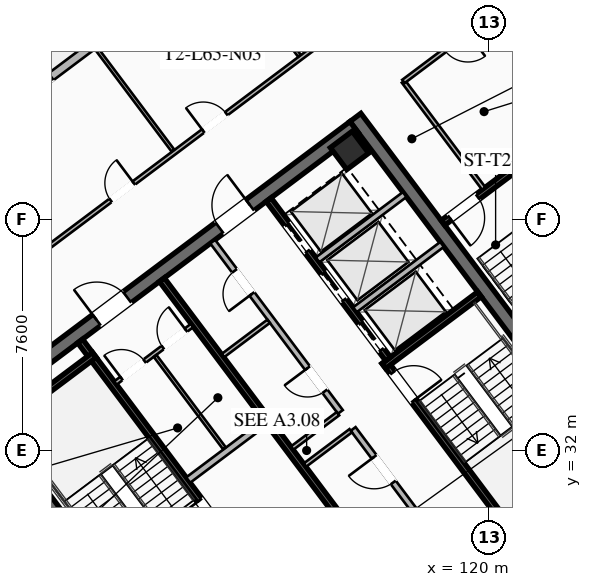
"""IFC4 building model, lengths in metres.
Left out: names, types, materials, properties, quantities, classifications, styles, units other than length and angle.
Written with IfcOpenShell. Run it as: python <this file> out.ifc"""

import sys

from ifc_helpers import new_model, si_unit, direction, frame, frame_2d, origin, origin_2d, place, context, subcontext, project, spatial, rectangle, hollow_rectangle, extrude, element, fill, save


model = new_model("IFC4")
c1 = context("Model", 3, precision=1e-05, world=origin(), true_north=direction((0.0, 1.0)))
c2 = subcontext(c1, "Body", "Model", "MODEL_VIEW")
j1 = project(units=[si_unit("LENGTHUNIT", "METRE"), si_unit("PLANEANGLEUNIT", "RADIAN")], contexts=[c1])
p1 = place(None, origin())
s1 = spatial("IfcSite", under=j1, at=p1, CompositionType="ELEMENT")
p2 = place(p1, origin())
s2 = spatial("IfcBuilding", under=s1, at=p2, CompositionType="ELEMENT")
p3 = place(p2, frame((0.0, 0.0, 239.7)))
s3 = spatial("IfcBuildingStorey", under=s2, at=p3, CompositionType="ELEMENT", Elevation=239.7)
for number, where, z_axis, x_axis in (
    (1, (112.396, 21.047, 0.0), (0.0, 0.0, 1.0), (-0.6, 0.8, 0.0)),
    (2, (115.604, 42.953, 0.0), (0.0, 0.0, 1.0), (0.6, -0.8, 0.0)),
):
    element("IfcWall", number, at=place(p3, frame(where, z_axis=z_axis, x_axis=x_axis)), inside=s3, PredefinedType="SHEAR", context=c2, shape_type="SweptSolid", body=[
        extrude(rectangle(XDim=15.6, YDim=0.45, at=frame_2d((7.8, 0.0))), origin(), (0.0, 0.0, 1.0), 3.55),
    ])
p4 = place(p3, frame((124.649, 30.518, 0.0), z_axis=(0.0, 0.0, 1.0), x_axis=(-0.8, -0.6, 0.0)))
e3 = element("IfcWall", 3, at=p4, inside=s3, PredefinedType="SHEAR", context=c2, shape_type="SweptSolid", body=[
    extrude(rectangle(XDim=15.26, YDim=0.45, at=frame_2d((7.63, 0.0))), origin(), (0.0, 0.0, 1.0), 3.55),
])
p5 = place(p4, frame((9.33, 0.0, 0.0)))
e4 = element("IfcOpeningElement", 4, at=p5, cuts=e3, PredefinedType="OPENING", context=c2, shape_type="SweptSolid", body=[
    extrude(rectangle(XDim=1.25, YDim=2.25, at=frame_2d((0.625, 1.125))), frame((0.0, 0.235, 0.0), z_axis=(0.0, -1.0, 0.0), x_axis=(1.0, 0.0, 0.0)), (0.0, 0.0, 1.0), 0.47),
])
p6 = place(p4, frame((4.28, 0.0, 0.0)))
e5 = element("IfcOpeningElement", 5, at=p6, cuts=e3, PredefinedType="OPENING", context=c2, shape_type="SweptSolid", body=[
    extrude(rectangle(XDim=1.25, YDim=2.25, at=frame_2d((0.625, 1.125))), frame((0.0, 0.235, 0.0), z_axis=(0.0, -1.0, 0.0), x_axis=(1.0, 0.0, 0.0)), (0.0, 0.0, 1.0), 0.47),
])
p7 = place(p3, frame((103.351, 33.482, 0.0), z_axis=(0.0, 0.0, 1.0), x_axis=(0.8, 0.6, 0.0)))
e6 = element("IfcWall", 6, at=p7, inside=s3, PredefinedType="SHEAR", context=c2, shape_type="SweptSolid", body=[
    extrude(rectangle(XDim=15.26, YDim=0.45, at=frame_2d((7.63, 0.0))), origin(), (0.0, 0.0, 1.0), 3.55),
])
p8 = place(p7, frame((4.68, 0.0, 0.0)))
e7 = element("IfcOpeningElement", 7, at=p8, cuts=e6, PredefinedType="OPENING", context=c2, shape_type="SweptSolid", body=[
    extrude(rectangle(XDim=1.25, YDim=2.25, at=frame_2d((0.625, 1.125))), frame((0.0, 0.235, 0.0), z_axis=(0.0, -1.0, 0.0), x_axis=(1.0, 0.0, 0.0)), (0.0, 0.0, 1.0), 0.47),
])
p9 = place(p7, frame((9.73, 0.0, 0.0)))
e8 = element("IfcOpeningElement", 8, at=p9, cuts=e6, PredefinedType="OPENING", context=c2, shape_type="SweptSolid", body=[
    extrude(rectangle(XDim=1.25, YDim=2.25, at=frame_2d((0.625, 1.125))), frame((0.0, 0.235, 0.0), z_axis=(0.0, -1.0, 0.0), x_axis=(1.0, 0.0, 0.0)), (0.0, 0.0, 1.0), 0.47),
])
p10 = place(p3, frame((115.41, 41.87, 0.0), z_axis=(0.0, 0.0, 1.0), x_axis=(0.799999996291, 0.600000004945, 0.0)))
e9 = element("IfcColumn", 9, at=p10, inside=s3, PredefinedType="COLUMN", context=c2, shape_type="SweptSolid", body=[
    extrude(hollow_rectangle(XDim=0.9, YDim=0.9, WallThickness=0.04, at=origin_2d()), origin(), (0.0, 0.0, 1.0), 3.37),
])
p11 = place(p3, frame((101.672, 41.354, 0.0), z_axis=(0.0, 0.0, 1.0), x_axis=(0.799986212866, 0.600018382406, 0.0)))
e10 = element("IfcWall", 10, at=p11, inside=s3, PredefinedType="SOLIDWALL", context=c2, shape_type="SweptSolid", body=[
    extrude(rectangle(XDim=8.5, YDim=0.28, at=frame_2d((4.25, 0.0))), origin(), (0.0, 0.0, 1.0), 3.37),
])
p12 = place(p11, frame((3.6, 0.0, 0.0)))
e11 = element("IfcOpeningElement", 11, at=p12, cuts=e10, PredefinedType="OPENING", context=c2, shape_type="SweptSolid", body=[
    extrude(rectangle(XDim=1.3, YDim=2.15, at=frame_2d((0.65, 1.075))), frame((0.0, 0.15, 0.0), z_axis=(0.0, -1.0, 0.0), x_axis=(1.0, 0.0, 0.0)), (0.0, 0.0, 1.0), 0.3),
])
p13 = place(p3, frame((111.44, 29.08, 0.0), z_axis=(0.0, 0.0, 1.0), x_axis=(-0.59999041401, 0.800007189403, 0.0)))
e12 = element("IfcWall", 12, at=p13, inside=s3, PredefinedType="SHEAR", context=c2, shape_type="SweptSolid", body=[
    extrude(rectangle(XDim=8.15, YDim=0.2, at=frame_2d((4.075, 0.0))), origin(), (0.0, 0.0, 1.0), 3.37),
])
p14 = place(p13, frame((0.45, 0.0, 0.0)))
e13 = element("IfcOpeningElement", 13, at=p14, cuts=e12, PredefinedType="OPENING", context=c2, shape_type="SweptSolid", body=[
    extrude(rectangle(XDim=1.15, YDim=2.2, at=frame_2d((0.575, 1.1))), frame((0.0, 0.11, 0.0), z_axis=(0.0, -1.0, 0.0), x_axis=(1.0, 0.0, 0.0)), (0.0, 0.0, 1.0), 0.22),
])
p15 = place(p3, frame((103.876, 32.782, 0.0), z_axis=(0.0, 0.0, 1.0), x_axis=(0.800014909178, 0.599980120581, 0.0)))
e14 = element("IfcWall", 14, at=p15, inside=s3, PredefinedType="SHEAR", context=c2, shape_type="SweptSolid", body=[
    extrude(rectangle(XDim=3.93, YDim=0.2, at=frame_2d((1.965, 0.0))), origin(), (0.0, 0.0, 1.0), 3.37),
])
p16 = place(p3, frame((116.56, 34.92, 0.0), z_axis=(0.0, 0.0, 1.0), x_axis=(0.59999041401, -0.800007189403, 0.0)))
e15 = element("IfcWall", 15, at=p16, inside=s3, PredefinedType="SHEAR", context=c2, shape_type="SweptSolid", body=[
    extrude(rectangle(XDim=8.15, YDim=0.2, at=frame_2d((4.075, 0.0))), origin(), (0.0, 0.0, 1.0), 3.37),
])
p17 = place(p16, frame((0.45, 0.0, 0.0)))
e16 = element("IfcOpeningElement", 16, at=p17, cuts=e15, PredefinedType="OPENING", context=c2, shape_type="SweptSolid", body=[
    extrude(rectangle(XDim=1.15, YDim=2.2, at=frame_2d((0.575, 1.1))), frame((0.0, 0.11, 0.0), z_axis=(0.0, -1.0, 0.0), x_axis=(1.0, 0.0, 0.0)), (0.0, 0.0, 1.0), 0.22),
])
p18 = place(p3, frame((116.54, 34.78, 0.0), z_axis=(0.0, 0.0, 1.0), x_axis=(0.800014909178, 0.599980120581, 0.0)))
e17 = element("IfcWall", 17, at=p18, inside=s3, PredefinedType="SHEAR", context=c2, shape_type="SweptSolid", body=[
    extrude(rectangle(XDim=3.93, YDim=0.2, at=frame_2d((1.965, 0.0))), origin(), (0.0, 0.0, 1.0), 3.37),
])
p19 = place(p3, frame((118.058, 25.856, 0.0), z_axis=(0.0, 0.0, 1.0), x_axis=(-0.600002657301, 0.799998007018, 0.0)))
e18 = element("IfcWall", 18, at=p19, inside=s3, PredefinedType="SHEAR", context=c2, shape_type="SweptSolid", body=[
    extrude(rectangle(XDim=14.7, YDim=0.2, at=frame_2d((7.35, 0.0))), origin(), (0.0, 0.0, 1.0), 3.37),
])
p20 = place(p3, frame((110.104, 31.028, 0.0), z_axis=(0.0, 0.0, 1.0), x_axis=(0.800018601094, 0.59997519774, 0.0)))
e19 = element("IfcWall", 19, at=p20, inside=s3, PredefinedType="SOLIDWALL", context=c2, shape_type="SweptSolid", body=[
    extrude(rectangle(XDim=3.15, YDim=0.22, at=frame_2d((1.575, 0.0))), origin(), (0.0, 0.0, 1.0), 2.723),
])
p21 = place(p3, frame((112.75, 40.25, 0.0), z_axis=(0.0, 0.0, 1.0), x_axis=(0.599994036198, -0.800004472816, 0.0)))
e20 = element("IfcWall", 20, at=p21, inside=s3, PredefinedType="SHEAR", context=c2, shape_type="SweptSolid", body=[
    extrude(rectangle(XDim=6.55, YDim=0.2, at=frame_2d((3.275, 0.0))), origin(), (0.0, 0.0, 1.0), 3.37),
])
p22 = place(p21, frame((5.075, 0.0, 0.0)))
e21 = element("IfcOpeningElement", 21, at=p22, cuts=e20, PredefinedType="OPENING", context=c2, shape_type="SweptSolid", body=[
    extrude(rectangle(XDim=1.1, YDim=2.2, at=frame_2d((0.55, 1.1))), frame((0.0, 0.11, 0.0), z_axis=(0.0, -1.0, 0.0), x_axis=(1.0, 0.0, 0.0)), (0.0, 0.0, 1.0), 0.22),
])
p23 = place(p21, frame((3.025, 0.0, 0.0)))
e22 = element("IfcOpeningElement", 22, at=p23, cuts=e20, PredefinedType="OPENING", context=c2, shape_type="SweptSolid", body=[
    extrude(rectangle(XDim=1.1, YDim=2.2, at=frame_2d((0.55, 1.1))), frame((0.0, 0.11, 0.0), z_axis=(0.0, -1.0, 0.0), x_axis=(1.0, 0.0, 0.0)), (0.0, 0.0, 1.0), 0.22),
])
p24 = place(p21, frame((1.025, 0.0, 0.0)))
e23 = element("IfcOpeningElement", 23, at=p24, cuts=e20, PredefinedType="OPENING", context=c2, shape_type="SweptSolid", body=[
    extrude(rectangle(XDim=1.1, YDim=2.2, at=frame_2d((0.55, 1.1))), frame((0.0, 0.11, 0.0), z_axis=(0.0, -1.0, 0.0), x_axis=(1.0, 0.0, 0.0)), (0.0, 0.0, 1.0), 0.22),
])
for number, where, z_axis, x_axis in (
    (24, (115.59, 36.63, 0.0), (0.0, 0.0, 1.0), (0.8, 0.6, 0.0)),
    (25, (114.36, 38.27, 0.0), (0.0, 0.0, 1.0), (0.8, 0.6, 0.0)),
):
    element("IfcWall", number, at=place(p3, frame(where, z_axis=z_axis, x_axis=x_axis)), inside=s3, PredefinedType="SOLIDWALL", context=c2, shape_type="SweptSolid", body=[
        extrude(rectangle(XDim=3.58, YDim=0.2, at=frame_2d((1.79, 0.0))), origin(), (0.0, 0.0, 1.0), 3.37),
    ])
p25 = place(p3, frame((107.71, 34.22, 0.0), z_axis=(0.0, 0.0, 1.0), x_axis=(0.799981399002, 0.60002480053, 0.0)))
e26 = element("IfcWall", 26, at=p25, inside=s3, PredefinedType="PARTITIONING", context=c2, shape_type="SweptSolid", body=[
    extrude(rectangle(XDim=3.15, YDim=0.135, at=frame_2d((1.575, 0.0))), origin(), (0.0, 0.0, 1.0), 2.723),
])
p26 = place(p25, frame((0.25, 0.0, 0.0)))
e27 = element("IfcOpeningElement", 27, at=p26, cuts=e26, PredefinedType="OPENING", context=c2, shape_type="SweptSolid", body=[
    extrude(rectangle(XDim=0.95, YDim=2.05, at=frame_2d((0.475, 1.025))), frame((0.0, 0.077, 0.0), z_axis=(0.0, -1.0, 0.0), x_axis=(1.0, 0.0, 0.0)), (0.0, 0.0, 1.0), 0.155),
])
p27 = place(p25, frame((1.95, 0.0, 0.0)))
e28 = element("IfcOpeningElement", 28, at=p27, cuts=e26, PredefinedType="OPENING", context=c2, shape_type="SweptSolid", body=[
    extrude(rectangle(XDim=0.95, YDim=2.05, at=frame_2d((0.475, 1.025))), frame((0.0, 0.077, 0.0), z_axis=(0.0, -1.0, 0.0), x_axis=(1.0, 0.0, 0.0)), (0.0, 0.0, 1.0), 0.155),
])
p28 = place(p3, frame((111.296, 32.072, 0.0), z_axis=(0.0, 0.0, 1.0), x_axis=(-0.59995887973, 0.800030838552, 0.0)))
e29 = element("IfcWall", 29, at=p28, inside=s3, PredefinedType="PARTITIONING", context=c2, shape_type="SweptSolid", body=[
    extrude(rectangle(XDim=3.8, YDim=0.11, at=frame_2d((1.9, 0.0))), origin(), (0.0, 0.0, 1.0), 2.723),
])
p29 = place(p3, frame((119.73, 27.11, 0.0), z_axis=(0.0, 0.0, 1.0), x_axis=(-0.600005580459, 0.799995814625, 0.0)))
e30 = element("IfcWall", 30, at=p29, inside=s3, PredefinedType="SOLIDWALL", context=c2, shape_type="SweptSolid", body=[
    extrude(rectangle(XDim=7.0, YDim=0.2, at=frame_2d((3.5, 0.0))), origin(), (0.0, 0.0, 1.0), 2.723),
])
p30 = place(p29, frame((0.85, 0.0, 0.0)))
e31 = element("IfcOpeningElement", 31, at=p30, cuts=e30, PredefinedType="OPENING", context=c2, shape_type="SweptSolid", body=[
    extrude(rectangle(XDim=0.95, YDim=2.05, at=frame_2d((0.475, 1.025))), frame((0.0, 0.11, 0.0), z_axis=(0.0, -1.0, 0.0), x_axis=(1.0, 0.0, 0.0)), (0.0, 0.0, 1.0), 0.22),
])
p31 = place(p29, frame((4.8, 0.0, 0.0)))
e32 = element("IfcOpeningElement", 32, at=p31, cuts=e30, PredefinedType="OPENING", context=c2, shape_type="SweptSolid", body=[
    extrude(rectangle(XDim=1.05, YDim=2.2, at=frame_2d((0.525, 1.1))), frame((0.0, 0.11, 0.0), z_axis=(0.0, -1.0, 0.0), x_axis=(1.0, 0.0, 0.0)), (0.0, 0.0, 1.0), 0.22),
])
p32 = place(p3, frame((113.946, 31.522, 0.0), z_axis=(0.0, 0.0, 1.0), x_axis=(0.8, 0.6, 0.0)))
e33 = element("IfcWall", 33, at=p32, inside=s3, PredefinedType="PARTITIONING", context=c2, shape_type="SweptSolid", body=[
    extrude(rectangle(XDim=1.88, YDim=0.135, at=frame_2d((0.94, 0.0))), origin(), (0.0, 0.0, 1.0), 2.723),
])
p33 = place(p3, frame((115.11, 33.27, 0.0), z_axis=(0.0, 0.0, 1.0), x_axis=(-0.600011160345, 0.79999162962, 0.0)))
e34 = element("IfcWall", 34, at=p33, inside=s3, PredefinedType="SOLIDWALL", context=c2, shape_type="SweptSolid", body=[
    extrude(rectangle(XDim=7.0, YDim=0.2, at=frame_2d((3.5, 0.0))), origin(), (0.0, 0.0, 1.0), 2.723),
])
p34 = place(p33, frame((0.85, 0.0, 0.0)))
e35 = element("IfcOpeningElement", 35, at=p34, cuts=e34, PredefinedType="OPENING", context=c2, shape_type="SweptSolid", body=[
    extrude(rectangle(XDim=0.95, YDim=2.05, at=frame_2d((0.475, 1.025))), frame((0.0, 0.11, 0.0), z_axis=(0.0, -1.0, 0.0), x_axis=(1.0, 0.0, 0.0)), (0.0, 0.0, 1.0), 0.22),
])
p35 = place(p33, frame((4.85, 0.0, 0.0)))
e36 = element("IfcOpeningElement", 36, at=p35, cuts=e34, PredefinedType="OPENING", context=c2, shape_type="SweptSolid", body=[
    extrude(rectangle(XDim=0.95, YDim=2.05, at=frame_2d((0.475, 1.025))), frame((0.0, 0.11, 0.0), z_axis=(0.0, -1.0, 0.0), x_axis=(1.0, 0.0, 0.0)), (0.0, 0.0, 1.0), 0.22),
])
p36 = place(p3, frame((113.526, 32.082, 0.0), z_axis=(0.0, 0.0, 1.0), x_axis=(0.800046745961, 0.599937666993, 0.0)))
e37 = element("IfcWall", 37, at=p36, inside=s3, PredefinedType="PARTITIONING", context=c2, shape_type="SweptSolid", body=[
    extrude(rectangle(XDim=1.88, YDim=0.135, at=frame_2d((0.94, 0.0))), origin(), (0.0, 0.0, 1.0), 2.723),
])
p37 = place(p3, frame((111.246, 35.122, 0.0), z_axis=(0.0, 0.0, 1.0), x_axis=(0.8, 0.6, 0.0)))
e38 = element("IfcWall", 38, at=p37, inside=s3, PredefinedType="PARTITIONING", context=c2, shape_type="SweptSolid", body=[
    extrude(rectangle(XDim=1.88, YDim=0.135, at=frame_2d((0.94, 0.0))), origin(), (0.0, 0.0, 1.0), 2.723),
])
p38 = place(p3, frame((121.204, 41.528, 0.0), z_axis=(0.0, 0.0, 1.0), x_axis=(-0.800017232136, -0.599977023131, 0.0)))
e39 = element("IfcWall", 39, at=p38, inside=s3, PredefinedType="SHEAR", context=c2, shape_type="SweptSolid", body=[
    extrude(rectangle(XDim=3.4, YDim=0.2, at=frame_2d((1.7, 0.0))), origin(), (0.0, 0.0, 1.0), 3.37),
])
p39 = place(p38, frame((1.975, 0.0, 0.0)))
e40 = element("IfcOpeningElement", 40, at=p39, cuts=e39, PredefinedType="OPENING", context=c2, shape_type="SweptSolid", body=[
    extrude(rectangle(XDim=1.15, YDim=2.2, at=frame_2d((0.575, 1.1))), frame((0.0, 0.11, 0.0), z_axis=(0.0, -1.0, 0.0), x_axis=(1.0, 0.0, 0.0)), (0.0, 0.0, 1.0), 0.22),
])
p40 = place(p3, frame((119.824, 40.618, 0.0), z_axis=(0.0, 0.0, 1.0), x_axis=(-0.599982243973, 0.800013316712, 0.0)))
e41 = element("IfcWall", 41, at=p40, inside=s3, PredefinedType="PARTITIONING", context=c2, shape_type="SweptSolid", body=[
    extrude(rectangle(XDim=4.4, YDim=0.135, at=frame_2d((2.2, 0.0))), origin(), (0.0, 0.0, 1.0), 2.723),
])
p41 = place(p3, frame((98.93, 33.76, 0.0), z_axis=(0.0, 0.0, 1.0), x_axis=(0.8, 0.6, 0.0)))
e42 = element("IfcWall", 42, at=p41, inside=s3, PredefinedType="PARTITIONING", context=c2, shape_type="SweptSolid", body=[
    extrude(rectangle(XDim=23.85, YDim=0.135, at=frame_2d((11.925, 0.0))), origin(), (0.0, 0.0, 1.0), 2.723),
])
p42 = place(p41, frame((0.3, 0.0, 0.0)))
e43 = element("IfcOpeningElement", 43, at=p42, cuts=e42, PredefinedType="OPENING", context=c2, shape_type="SweptSolid", body=[
    extrude(rectangle(XDim=0.95, YDim=2.05, at=frame_2d((0.475, 1.025))), frame((0.0, 0.077, 0.0), z_axis=(0.0, -1.0, 0.0), x_axis=(1.0, 0.0, 0.0)), (0.0, 0.0, 1.0), 0.155),
])
p43 = place(p41, frame((10.779, 0.0, 0.0)))
e44 = element("IfcOpeningElement", 44, at=p43, cuts=e42, PredefinedType="OPENING", context=c2, shape_type="SweptSolid", body=[
    extrude(rectangle(XDim=0.95, YDim=2.05, at=frame_2d((0.475, 1.025))), frame((0.0, 0.077, 0.0), z_axis=(0.0, -1.0, 0.0), x_axis=(1.0, 0.0, 0.0)), (0.0, 0.0, 1.0), 0.155),
])
p44 = place(p41, frame((14.585, 0.0, 0.0)))
e45 = element("IfcOpeningElement", 45, at=p44, cuts=e42, PredefinedType="OPENING", context=c2, shape_type="SweptSolid", body=[
    extrude(rectangle(XDim=0.95, YDim=2.05, at=frame_2d((0.475, 1.025))), frame((0.0, 0.077, 0.0), z_axis=(0.0, -1.0, 0.0), x_axis=(1.0, 0.0, 0.0)), (0.0, 0.0, 1.0), 0.155),
])
p45 = place(p41, frame((22.6, 0.0, 0.0)))
e46 = element("IfcOpeningElement", 46, at=p45, cuts=e42, PredefinedType="OPENING", context=c2, shape_type="SweptSolid", body=[
    extrude(rectangle(XDim=0.95, YDim=2.05, at=frame_2d((0.475, 1.025))), frame((0.0, 0.077, 0.0), z_axis=(0.0, -1.0, 0.0), x_axis=(1.0, 0.0, 0.0)), (0.0, 0.0, 1.0), 0.155),
])
for number, where, z_axis, x_axis in (
    (47, (109.602, 41.864, 0.0), (0.0, 0.0, 1.0), (-0.6, 0.8, 0.0)),
    (48, (113.762, 44.984, 0.0), (0.0, 0.0, 1.0), (-0.6, 0.8, 0.0)),
):
    element("IfcWall", number, at=place(p3, frame(where, z_axis=z_axis, x_axis=x_axis)), inside=s3, PredefinedType="PARTITIONING", context=c2, shape_type="SweptSolid", body=[
        extrude(rectangle(XDim=4.2, YDim=0.11, at=frame_2d((2.1, 0.0))), origin(), (0.0, 0.0, 1.0), 2.723),
    ])
p46 = place(p3, frame((121.224, 47.168, 0.0), z_axis=(0.0, 0.0, 1.0), x_axis=(-0.8, -0.6, 0.0)))
e49 = element("IfcWall", 49, at=p46, inside=s3, PredefinedType="PARTITIONING", context=c2, shape_type="SweptSolid", body=[
    extrude(rectangle(XDim=5.05, YDim=0.135, at=frame_2d((2.525, 0.0))), origin(), (0.0, 0.0, 1.0), 2.723),
])
p47 = place(p46, frame((2.4, 0.0, 0.0)))
e50 = element("IfcOpeningElement", 50, at=p47, cuts=e49, PredefinedType="OPENING", context=c2, shape_type="SweptSolid", body=[
    extrude(rectangle(XDim=0.95, YDim=2.05, at=frame_2d((0.475, 1.025))), frame((0.0, 0.077, 0.0), z_axis=(0.0, -1.0, 0.0), x_axis=(1.0, 0.0, 0.0)), (0.0, 0.0, 1.0), 0.155),
])
p48 = place(p3, frame((111.752, 16.664, 0.0), z_axis=(0.0, 0.0, 1.0), x_axis=(-0.599998165212, 0.800001376088, 0.0)))
e51 = element("IfcWall", 51, at=p48, inside=s3, PredefinedType="PARTITIONING", context=c2, shape_type="SweptSolid", body=[
    extrude(rectangle(XDim=21.29, YDim=0.135, at=frame_2d((10.645, 0.0))), origin(), (0.0, 0.0, 1.0), 2.723),
])
p49 = place(p48, frame((0.3, 0.0, 0.0)))
e52 = element("IfcOpeningElement", 52, at=p49, cuts=e51, PredefinedType="OPENING", context=c2, shape_type="SweptSolid", body=[
    extrude(rectangle(XDim=0.95, YDim=2.05, at=frame_2d((0.475, 1.025))), frame((0.0, 0.077, 0.0), z_axis=(0.0, -1.0, 0.0), x_axis=(1.0, 0.0, 0.0)), (0.0, 0.0, 1.0), 0.155),
])
p50 = place(p8, origin())
e53 = element("IfcDoor", 53, at=p50, inside=s3, OperationType="SINGLE_SWING_LEFT", PredefinedType="DOOR", context=c2, shape_type="SweptSolid", body=[
    extrude(rectangle(XDim=1.25, YDim=2.25, at=frame_2d((0.625, 1.125))), frame((0.0, 0.025, 0.0), z_axis=(0.0, -1.0, 0.0), x_axis=(1.0, 0.0, 0.0)), (0.0, 0.0, 1.0), 0.05),
])
fill(e7, e53)
p51 = place(p9, origin())
e54 = element("IfcDoor", 54, at=p51, inside=s3, OperationType="SINGLE_SWING_RIGHT", PredefinedType="DOOR", context=c2, shape_type="SweptSolid", body=[
    extrude(rectangle(XDim=1.25, YDim=2.25, at=frame_2d((0.625, 1.125))), frame((0.0, 0.025, 0.0), z_axis=(0.0, -1.0, 0.0), x_axis=(1.0, 0.0, 0.0)), (0.0, 0.0, 1.0), 0.05),
])
fill(e8, e54)
p52 = place(p14, origin())
e55 = element("IfcDoor", 55, at=p52, inside=s3, OperationType="SINGLE_SWING_RIGHT", PredefinedType="DOOR", context=c2, shape_type="SweptSolid", body=[
    extrude(rectangle(XDim=1.15, YDim=2.2, at=frame_2d((0.575, 1.1))), frame((0.0, 0.025, 0.0), z_axis=(0.0, -1.0, 0.0), x_axis=(1.0, 0.0, 0.0)), (0.0, 0.0, 1.0), 0.05),
])
fill(e13, e55)
p53 = place(p17, origin())
e56 = element("IfcDoor", 56, at=p53, inside=s3, OperationType="SINGLE_SWING_RIGHT", PredefinedType="DOOR", context=c2, shape_type="SweptSolid", body=[
    extrude(rectangle(XDim=1.15, YDim=2.2, at=frame_2d((0.575, 1.1))), frame((0.0, 0.025, 0.0), z_axis=(0.0, -1.0, 0.0), x_axis=(1.0, 0.0, 0.0)), (0.0, 0.0, 1.0), 0.05),
])
fill(e16, e56)
p54 = place(p26, origin())
e57 = element("IfcDoor", 57, at=p54, inside=s3, OperationType="SINGLE_SWING_LEFT", PredefinedType="DOOR", context=c2, shape_type="SweptSolid", body=[
    extrude(rectangle(XDim=0.95, YDim=2.05, at=frame_2d((0.475, 1.025))), frame((0.0, 0.025, 0.0), z_axis=(0.0, -1.0, 0.0), x_axis=(1.0, 0.0, 0.0)), (0.0, 0.0, 1.0), 0.05),
])
fill(e27, e57)
p55 = place(p27, origin())
e58 = element("IfcDoor", 58, at=p55, inside=s3, OperationType="SINGLE_SWING_RIGHT", PredefinedType="DOOR", context=c2, shape_type="SweptSolid", body=[
    extrude(rectangle(XDim=0.95, YDim=2.05, at=frame_2d((0.475, 1.025))), frame((0.0, 0.025, 0.0), z_axis=(0.0, -1.0, 0.0), x_axis=(1.0, 0.0, 0.0)), (0.0, 0.0, 1.0), 0.05),
])
fill(e28, e58)
p56 = place(p31, origin())
e59 = element("IfcDoor", 59, at=p56, inside=s3, OperationType="SINGLE_SWING_RIGHT", PredefinedType="DOOR", context=c2, shape_type="SweptSolid", body=[
    extrude(rectangle(XDim=1.05, YDim=2.2, at=frame_2d((0.525, 1.1))), frame((0.0, 0.025, 0.0), z_axis=(0.0, -1.0, 0.0), x_axis=(1.0, 0.0, 0.0)), (0.0, 0.0, 1.0), 0.05),
])
fill(e32, e59)
p57 = place(p34, origin())
e60 = element("IfcDoor", 60, at=p57, inside=s3, OperationType="SINGLE_SWING_RIGHT", PredefinedType="DOOR", context=c2, shape_type="SweptSolid", body=[
    extrude(rectangle(XDim=0.95, YDim=2.05, at=frame_2d((0.475, 1.025))), frame((0.0, 0.025, 0.0), z_axis=(0.0, -1.0, 0.0), x_axis=(1.0, 0.0, 0.0)), (0.0, 0.0, 1.0), 0.05),
])
fill(e35, e60)
p58 = place(p35, origin())
e61 = element("IfcDoor", 61, at=p58, inside=s3, OperationType="SINGLE_SWING_LEFT", PredefinedType="DOOR", context=c2, shape_type="SweptSolid", body=[
    extrude(rectangle(XDim=0.95, YDim=2.05, at=frame_2d((0.475, 1.025))), frame((0.0, 0.025, 0.0), z_axis=(0.0, -1.0, 0.0), x_axis=(1.0, 0.0, 0.0)), (0.0, 0.0, 1.0), 0.05),
])
fill(e36, e61)
p59 = place(p39, origin())
e62 = element("IfcDoor", 62, at=p59, inside=s3, OperationType="SINGLE_SWING_RIGHT", PredefinedType="DOOR", context=c2, shape_type="SweptSolid", body=[
    extrude(rectangle(XDim=1.15, YDim=2.2, at=frame_2d((0.575, 1.1))), frame((0.0, 0.025, 0.0), z_axis=(0.0, -1.0, 0.0), x_axis=(1.0, 0.0, 0.0)), (0.0, 0.0, 1.0), 0.05),
])
fill(e40, e62)
p60 = place(p43, origin())
e63 = element("IfcDoor", 63, at=p60, inside=s3, OperationType="SINGLE_SWING_RIGHT", PredefinedType="DOOR", context=c2, shape_type="SweptSolid", body=[
    extrude(rectangle(XDim=0.95, YDim=2.05, at=frame_2d((0.475, 1.025))), frame((0.0, 0.025, 0.0), z_axis=(0.0, -1.0, 0.0), x_axis=(1.0, 0.0, 0.0)), (0.0, 0.0, 1.0), 0.05),
])
fill(e44, e63)
p61 = place(p44, origin())
e64 = element("IfcDoor", 64, at=p61, inside=s3, OperationType="SINGLE_SWING_LEFT", PredefinedType="DOOR", context=c2, shape_type="SweptSolid", body=[
    extrude(rectangle(XDim=0.95, YDim=2.05, at=frame_2d((0.475, 1.025))), frame((0.0, 0.025, 0.0), z_axis=(0.0, -1.0, 0.0), x_axis=(1.0, 0.0, 0.0)), (0.0, 0.0, 1.0), 0.05),
])
fill(e45, e64)
p62 = place(p22, origin())
e65 = element("IfcDoor", 65, at=p62, inside=s3, OperationType="SLIDING_TO_LEFT", PredefinedType="DOOR", context=c2, shape_type="SweptSolid", body=[
    extrude(rectangle(XDim=1.1, YDim=2.2, at=frame_2d((0.55, 1.1))), frame((0.0, 0.025, 0.0), z_axis=(0.0, -1.0, 0.0), x_axis=(1.0, 0.0, 0.0)), (0.0, 0.0, 1.0), 0.05),
])
fill(e21, e65)
p63 = place(p23, origin())
e66 = element("IfcDoor", 66, at=p63, inside=s3, OperationType="SLIDING_TO_LEFT", PredefinedType="DOOR", context=c2, shape_type="SweptSolid", body=[
    extrude(rectangle(XDim=1.1, YDim=2.2, at=frame_2d((0.55, 1.1))), frame((0.0, 0.025, 0.0), z_axis=(0.0, -1.0, 0.0), x_axis=(1.0, 0.0, 0.0)), (0.0, 0.0, 1.0), 0.05),
])
fill(e22, e66)
p64 = place(p24, origin())
e67 = element("IfcDoor", 67, at=p64, inside=s3, OperationType="SLIDING_TO_LEFT", PredefinedType="DOOR", context=c2, shape_type="SweptSolid", body=[
    extrude(rectangle(XDim=1.1, YDim=2.2, at=frame_2d((0.55, 1.1))), frame((0.0, 0.025, 0.0), z_axis=(0.0, -1.0, 0.0), x_axis=(1.0, 0.0, 0.0)), (0.0, 0.0, 1.0), 0.05),
])
fill(e23, e67)
save(model, sys.argv[1])
